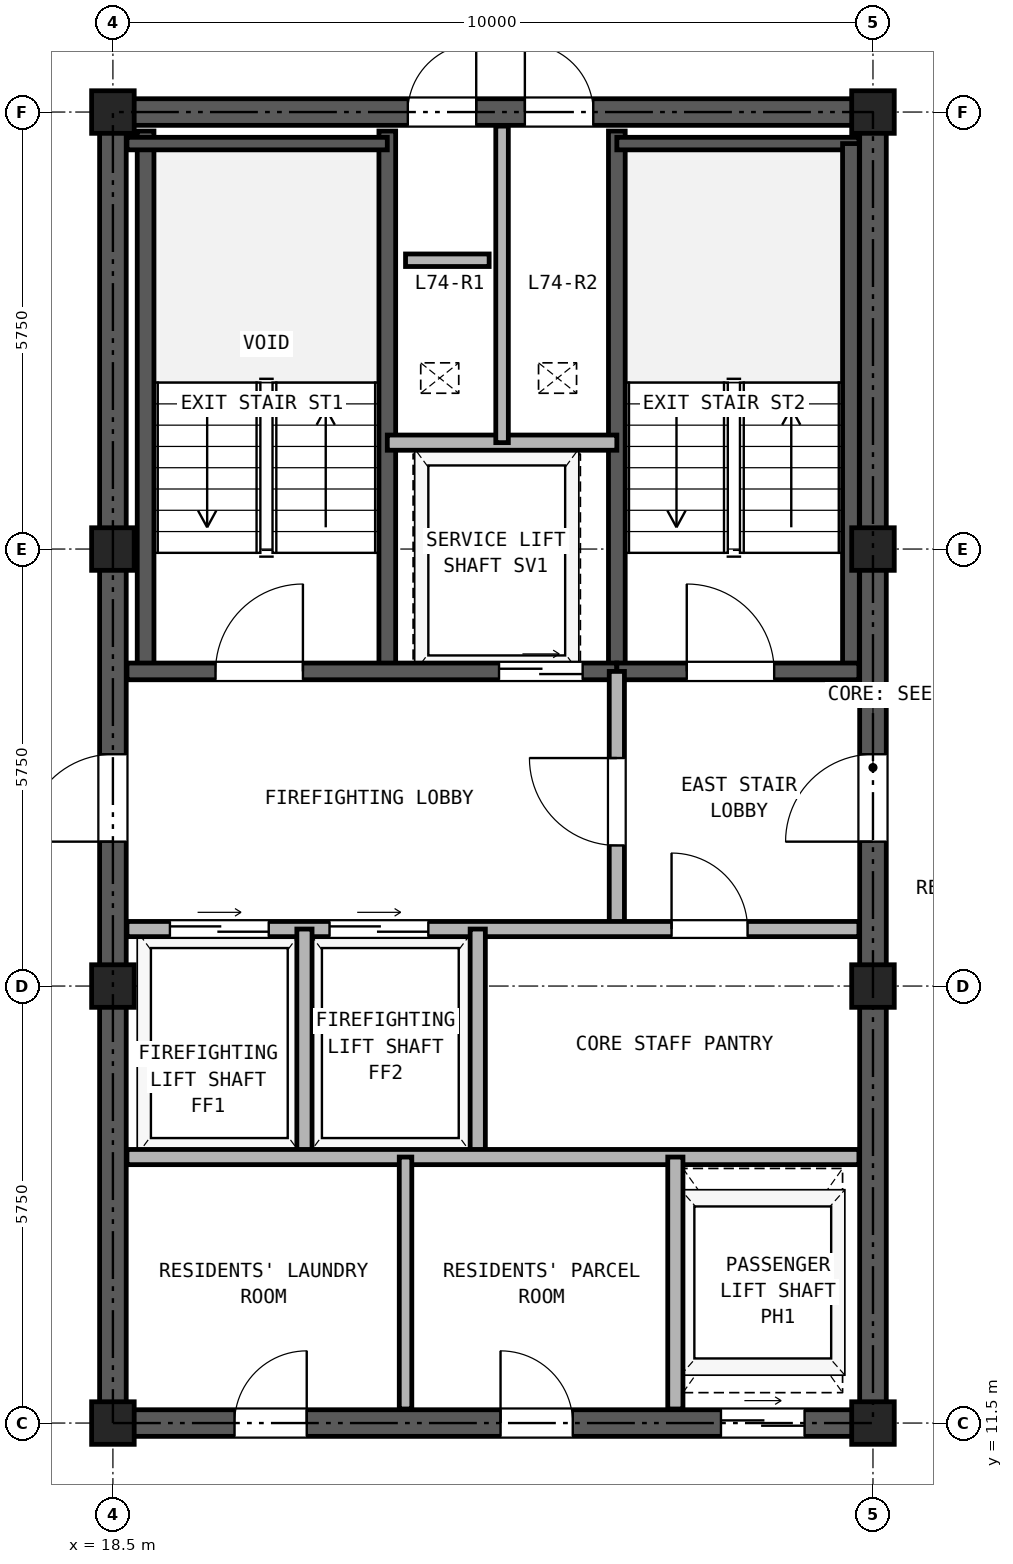
"""IFC4 building model, lengths in metres.
Left out: names, types, materials, properties, quantities, classifications, styles, units other than length and angle.
Written with IfcOpenShell. Run it as: python <this file> out.ifc"""

import sys

from ifc_helpers import new_model, si_unit, direction, frame, frame_2d, origin, origin_2d, place, context, subcontext, project, spatial, rectangle, hollow_rectangle, extrude, source, transform, mapped, element, fill, save


model = new_model("IFC4")
c1 = context("Model", 3, precision=1e-05, world=origin(), true_north=direction((0.0, 1.0)))
c2 = subcontext(c1, "Body", "Model", "MODEL_VIEW")
j1 = project(units=[si_unit("LENGTHUNIT", "METRE"), si_unit("PLANEANGLEUNIT", "RADIAN")], contexts=[c1])
p1 = place(None, origin())
s1 = spatial("IfcSite", under=j1, at=p1, CompositionType="ELEMENT")
p2 = place(p1, origin())
s2 = spatial("IfcBuilding", under=s1, at=p2, CompositionType="ELEMENT")
p3 = place(p2, frame((0.0, 0.0, 258.5)))
s3 = spatial("IfcBuildingStorey", under=s2, at=p3, CompositionType="ELEMENT", Elevation=258.5)
m1 = source(origin(), c2, "Body", "SweptSolid", [
    extrude(hollow_rectangle(XDim=0.56, YDim=0.56, WallThickness=0.03, at=origin_2d()), origin(), (0.0, 0.0, 1.0), 2.98),
])
for number, where, z_axis, x_axis in (
    (1, (18.5, 11.5, 0.0), (0.0, 0.0, 1.0), (1.0, 0.0, 0.0)),
    (2, (18.5, 17.25, 0.0), (0.0, 0.0, 1.0), (1.0, 0.0, 0.0)),
    (3, (18.5, 23.0, 0.0), (0.0, 0.0, 1.0), (1.0, 0.0, 0.0)),
    (4, (18.5, 28.75, 0.0), (0.0, 0.0, 1.0), (1.0, 0.0, 0.0)),
    (5, (28.5, 11.5, 0.0), (0.0, 0.0, 1.0), (1.0, 0.0, 0.0)),
    (6, (28.5, 17.25, 0.0), (0.0, 0.0, 1.0), (1.0, 0.0, 0.0)),
    (7, (28.5, 23.0, 0.0), (0.0, 0.0, 1.0), (1.0, 0.0, 0.0)),
    (8, (28.5, 28.75, 0.0), (0.0, 0.0, 1.0), (1.0, 0.0, 0.0)),
):
    element("IfcColumn", number, at=place(p3, frame(where, z_axis=z_axis, x_axis=x_axis)), inside=s3, PredefinedType="COLUMN", context=c2, shape_type="MappedRepresentation", body=[
        mapped(m1, transform((0.0, 0.0, 0.0), x_axis=(1.0, 0.0, 0.0), y_axis=(0.0, 1.0, 0.0), z_axis=(0.0, 0.0, 1.0), scale=1.0)),
    ])
p4 = place(p3, frame((18.325, 11.5, 0.0), z_axis=(0.0, 0.0, 1.0), x_axis=(1.0, 0.0, 0.0)))
e9 = element("IfcWall", 9, at=p4, inside=s3, PredefinedType="SHEAR", context=c2, shape_type="SweptSolid", body=[
    extrude(rectangle(XDim=10.35, YDim=0.35, at=frame_2d((5.175, 0.0))), origin(), (0.0, 0.0, 1.0), 2.98),
])
p5 = place(p4, frame((1.775, 0.0, 0.0)))
e10 = element("IfcOpeningElement", 10, at=p5, cuts=e9, PredefinedType="OPENING", context=c2, shape_type="SweptSolid", body=[
    extrude(rectangle(XDim=0.95, YDim=2.15, at=frame_2d((0.475, 1.075))), frame((0.0, 0.185, 0.0), z_axis=(0.0, -1.0, 0.0), x_axis=(1.0, 0.0, 0.0)), (0.0, 0.0, 1.0), 0.37),
])
p6 = place(p4, frame((5.275, 0.0, 0.0)))
e11 = element("IfcOpeningElement", 11, at=p6, cuts=e9, PredefinedType="OPENING", context=c2, shape_type="SweptSolid", body=[
    extrude(rectangle(XDim=0.95, YDim=2.15, at=frame_2d((0.475, 1.075))), frame((0.0, 0.185, 0.0), z_axis=(0.0, -1.0, 0.0), x_axis=(1.0, 0.0, 0.0)), (0.0, 0.0, 1.0), 0.37),
])
p7 = place(p4, frame((8.175, 0.0, 0.0)))
e12 = element("IfcOpeningElement", 12, at=p7, cuts=e9, PredefinedType="OPENING", context=c2, shape_type="SweptSolid", body=[
    extrude(rectangle(XDim=1.1, YDim=2.25, at=frame_2d((0.55, 1.125))), frame((0.0, 0.185, 0.0), z_axis=(0.0, -1.0, 0.0), x_axis=(1.0, 0.0, 0.0)), (0.0, 0.0, 1.0), 0.37),
])
p8 = place(p3, frame((18.325, 28.75, 0.0), z_axis=(0.0, 0.0, 1.0), x_axis=(1.0, 0.0, 0.0)))
e13 = element("IfcWall", 13, at=p8, inside=s3, PredefinedType="SHEAR", context=c2, shape_type="SweptSolid", body=[
    extrude(rectangle(XDim=10.35, YDim=0.35, at=frame_2d((5.175, 0.0))), origin(), (0.0, 0.0, 1.0), 2.98),
])
p9 = place(p8, frame((4.055, 0.0, 0.0)))
e14 = element("IfcOpeningElement", 14, at=p9, cuts=e13, PredefinedType="OPENING", context=c2, shape_type="SweptSolid", body=[
    extrude(rectangle(XDim=0.9, YDim=2.05, at=frame_2d((0.45, 1.025))), frame((0.0, 0.185, 0.0), z_axis=(0.0, -1.0, 0.0), x_axis=(1.0, 0.0, 0.0)), (0.0, 0.0, 1.0), 0.37),
])
p10 = place(p8, frame((5.595, 0.0, 0.0)))
e15 = element("IfcOpeningElement", 15, at=p10, cuts=e13, PredefinedType="OPENING", context=c2, shape_type="SweptSolid", body=[
    extrude(rectangle(XDim=0.9, YDim=2.05, at=frame_2d((0.45, 1.025))), frame((0.0, 0.185, 0.0), z_axis=(0.0, -1.0, 0.0), x_axis=(1.0, 0.0, 0.0)), (0.0, 0.0, 1.0), 0.37),
])
p11 = place(p3, frame((18.5, 11.675, 0.0), z_axis=(0.0, 0.0, 1.0), x_axis=(0.0, 1.0, 0.0)))
e16 = element("IfcWall", 16, at=p11, inside=s3, PredefinedType="SHEAR", context=c2, shape_type="SweptSolid", body=[
    extrude(rectangle(XDim=16.9, YDim=0.35, at=frame_2d((8.45, 0.0))), origin(), (0.0, 0.0, 1.0), 2.98),
])
p12 = place(p11, frame((7.475, 0.0, 0.0)))
e17 = element("IfcOpeningElement", 17, at=p12, cuts=e16, PredefinedType="OPENING", context=c2, shape_type="SweptSolid", body=[
    extrude(rectangle(XDim=1.15, YDim=2.2, at=frame_2d((0.575, 1.1))), frame((0.0, 0.185, 0.0), z_axis=(0.0, -1.0, 0.0), x_axis=(1.0, 0.0, 0.0)), (0.0, 0.0, 1.0), 0.37),
])
p13 = place(p3, frame((28.5, 11.675, 0.0), z_axis=(0.0, 0.0, 1.0), x_axis=(0.0, 1.0, 0.0)))
e18 = element("IfcWall", 18, at=p13, inside=s3, PredefinedType="SHEAR", context=c2, shape_type="SweptSolid", body=[
    extrude(rectangle(XDim=16.9, YDim=0.35, at=frame_2d((8.45, 0.0))), origin(), (0.0, 0.0, 1.0), 2.98),
])
p14 = place(p13, frame((7.475, 0.0, 0.0)))
e19 = element("IfcOpeningElement", 19, at=p14, cuts=e18, PredefinedType="OPENING", context=c2, shape_type="SweptSolid", body=[
    extrude(rectangle(XDim=1.15, YDim=2.2, at=frame_2d((0.575, 1.1))), frame((0.0, 0.185, 0.0), z_axis=(0.0, -1.0, 0.0), x_axis=(1.0, 0.0, 0.0)), (0.0, 0.0, 1.0), 0.37),
])
for number, where, z_axis, x_axis in (
    (20, (18.93, 21.39, 0.0), (0.0, 0.0, 1.0), (0.0, 1.0, 0.0)),
    (21, (22.11, 21.39, 0.0), (0.0, 0.0, 1.0), (0.0, 1.0, 0.0)),
    (22, (25.13, 21.39, 0.0), (0.0, 0.0, 1.0), (0.0, 1.0, 0.0)),
):
    element("IfcWall", number, at=place(p3, frame(where, z_axis=z_axis, x_axis=x_axis)), inside=s3, PredefinedType="SOLIDWALL", context=c2, shape_type="SweptSolid", body=[
        extrude(rectangle(XDim=7.11, YDim=0.22, at=frame_2d((3.555, 0.0))), origin(), (0.0, 0.0, 1.0), 2.98),
    ])
p15 = place(p3, frame((18.685, 28.335, 0.0), z_axis=(0.0, 0.0, 1.0), x_axis=(1.0, 0.0, 0.0)))
e23 = element("IfcWall", 23, at=p15, inside=s3, PredefinedType="PARTITIONING", context=c2, shape_type="SweptSolid", body=[
    extrude(rectangle(XDim=3.425, YDim=0.165, at=frame_2d((1.712, 0.0))), origin(), (0.0, 0.0, 1.0), 2.98),
])
p16 = place(p3, frame((25.13, 28.335, 0.0), z_axis=(0.0, 0.0, 1.0), x_axis=(1.0, 0.0, 0.0)))
e24 = element("IfcWall", 24, at=p16, inside=s3, PredefinedType="PARTITIONING", context=c2, shape_type="SweptSolid", body=[
    extrude(rectangle(XDim=3.185, YDim=0.165, at=frame_2d((1.593, 0.0))), origin(), (0.0, 0.0, 1.0), 2.98),
])
p17 = place(p3, frame((28.21, 21.39, 0.0), z_axis=(0.0, 0.0, 1.0), x_axis=(0.0, 1.0, 0.0)))
e25 = element("IfcWall", 25, at=p17, inside=s3, PredefinedType="SOLIDWALL", context=c2, shape_type="SweptSolid", body=[
    extrude(rectangle(XDim=6.945, YDim=0.22, at=frame_2d((3.473, 0.0))), origin(), (0.0, 0.0, 1.0), 2.98),
])
p18 = place(p3, frame((18.685, 21.39, 0.0), z_axis=(0.0, 0.0, 1.0), x_axis=(1.0, 0.0, 0.0)))
e26 = element("IfcWall", 26, at=p18, inside=s3, PredefinedType="SOLIDWALL", context=c2, shape_type="SweptSolid", body=[
    extrude(rectangle(XDim=6.445, YDim=0.22, at=frame_2d((3.222, 0.0))), origin(), (0.0, 0.0, 1.0), 2.98),
])
p19 = place(p18, frame((1.165, 0.0, 0.0)))
e27 = element("IfcOpeningElement", 27, at=p19, cuts=e26, PredefinedType="OPENING", context=c2, shape_type="SweptSolid", body=[
    extrude(rectangle(XDim=1.15, YDim=2.2, at=frame_2d((0.575, 1.1))), frame((0.0, 0.12, 0.0), z_axis=(0.0, -1.0, 0.0), x_axis=(1.0, 0.0, 0.0)), (0.0, 0.0, 1.0), 0.24),
])
p20 = place(p18, frame((4.895, 0.0, 0.0)))
e28 = element("IfcOpeningElement", 28, at=p20, cuts=e26, PredefinedType="OPENING", context=c2, shape_type="SweptSolid", body=[
    extrude(rectangle(XDim=1.1, YDim=2.25, at=frame_2d((0.55, 1.125))), frame((0.0, 0.12, 0.0), z_axis=(0.0, -1.0, 0.0), x_axis=(1.0, 0.0, 0.0)), (0.0, 0.0, 1.0), 0.24),
])
p21 = place(p3, frame((25.13, 21.39, 0.0), z_axis=(0.0, 0.0, 1.0), x_axis=(1.0, 0.0, 0.0)))
e29 = element("IfcWall", 29, at=p21, inside=s3, PredefinedType="SOLIDWALL", context=c2, shape_type="SweptSolid", body=[
    extrude(rectangle(XDim=3.185, YDim=0.22, at=frame_2d((1.593, 0.0))), origin(), (0.0, 0.0, 1.0), 2.98),
])
p22 = place(p21, frame((0.92, 0.0, 0.0)))
e30 = element("IfcOpeningElement", 30, at=p22, cuts=e29, PredefinedType="OPENING", context=c2, shape_type="SweptSolid", body=[
    extrude(rectangle(XDim=1.15, YDim=2.2, at=frame_2d((0.575, 1.1))), frame((0.0, 0.12, 0.0), z_axis=(0.0, -1.0, 0.0), x_axis=(1.0, 0.0, 0.0)), (0.0, 0.0, 1.0), 0.24),
])
p23 = place(p3, frame((22.11, 24.4, 0.0), z_axis=(0.0, 0.0, 1.0), x_axis=(1.0, 0.0, 0.0)))
e31 = element("IfcWall", 31, at=p23, inside=s3, PredefinedType="PARTITIONING", context=c2, shape_type="SweptSolid", body=[
    extrude(rectangle(XDim=3.02, YDim=0.2, at=frame_2d((1.51, 0.0))), origin(), (0.0, 0.0, 1.0), 2.98),
])
p24 = place(p3, frame((23.62, 24.4, 0.0), z_axis=(0.0, 0.0, 1.0), x_axis=(0.0, 1.0, 0.0)))
e32 = element("IfcWall", 32, at=p24, inside=s3, PredefinedType="PARTITIONING", context=c2, shape_type="SweptSolid", body=[
    extrude(rectangle(XDim=4.165, YDim=0.165, at=frame_2d((2.083, 0.0))), origin(), (0.0, 0.0, 1.0), 2.98),
])
p25 = place(p3, frame((25.13, 18.0, 0.0), z_axis=(0.0, 0.0, 1.0), x_axis=(0.0, 1.0, 0.0)))
e33 = element("IfcWall", 33, at=p25, inside=s3, PredefinedType="PARTITIONING", context=c2, shape_type="SweptSolid", body=[
    extrude(rectangle(XDim=3.39, YDim=0.2, at=frame_2d((1.695, 0.0))), origin(), (0.0, 0.0, 1.0), 2.98),
])
p26 = place(p25, frame((1.1, 0.0, 0.0)))
e34 = element("IfcOpeningElement", 34, at=p26, cuts=e33, PredefinedType="OPENING", context=c2, shape_type="SweptSolid", body=[
    extrude(rectangle(XDim=1.15, YDim=2.2, at=frame_2d((0.575, 1.1))), frame((0.0, 0.11, 0.0), z_axis=(0.0, -1.0, 0.0), x_axis=(1.0, 0.0, 0.0)), (0.0, 0.0, 1.0), 0.22),
])
p27 = place(p3, frame((18.685, 18.0, 0.0), z_axis=(0.0, 0.0, 1.0), x_axis=(1.0, 0.0, 0.0)))
e35 = element("IfcWall", 35, at=p27, inside=s3, PredefinedType="PARTITIONING", context=c2, shape_type="SweptSolid", body=[
    extrude(rectangle(XDim=9.63, YDim=0.2, at=frame_2d((4.815, 0.0))), origin(), (0.0, 0.0, 1.0), 2.98),
])
p28 = place(p27, frame((0.565, 0.0, 0.0)))
e36 = element("IfcOpeningElement", 36, at=p28, cuts=e35, PredefinedType="OPENING", context=c2, shape_type="SweptSolid", body=[
    extrude(rectangle(XDim=1.3, YDim=2.3, at=frame_2d((0.65, 1.15))), frame((0.0, 0.11, 0.0), z_axis=(0.0, -1.0, 0.0), x_axis=(1.0, 0.0, 0.0)), (0.0, 0.0, 1.0), 0.22),
])
p29 = place(p27, frame((2.665, 0.0, 0.0)))
e37 = element("IfcOpeningElement", 37, at=p29, cuts=e35, PredefinedType="OPENING", context=c2, shape_type="SweptSolid", body=[
    extrude(rectangle(XDim=1.3, YDim=2.3, at=frame_2d((0.65, 1.15))), frame((0.0, 0.11, 0.0), z_axis=(0.0, -1.0, 0.0), x_axis=(1.0, 0.0, 0.0)), (0.0, 0.0, 1.0), 0.22),
])
p30 = place(p27, frame((7.165, 0.0, 0.0)))
e38 = element("IfcOpeningElement", 38, at=p30, cuts=e35, PredefinedType="OPENING", context=c2, shape_type="SweptSolid", body=[
    extrude(rectangle(XDim=1.0, YDim=2.15, at=frame_2d((0.5, 1.075))), frame((0.0, 0.11, 0.0), z_axis=(0.0, -1.0, 0.0), x_axis=(1.0, 0.0, 0.0)), (0.0, 0.0, 1.0), 0.22),
])
for number, where, z_axis, x_axis in (
    (39, (21.02, 15.0, 0.0), (0.0, 0.0, 1.0), (0.0, 1.0, 0.0)),
    (40, (23.3, 15.0, 0.0), (0.0, 0.0, 1.0), (0.0, 1.0, 0.0)),
):
    element("IfcWall", number, at=place(p3, frame(where, z_axis=z_axis, x_axis=x_axis)), inside=s3, PredefinedType="PARTITIONING", context=c2, shape_type="SweptSolid", body=[
        extrude(rectangle(XDim=3.0, YDim=0.2, at=frame_2d((1.5, 0.0))), origin(), (0.0, 0.0, 1.0), 2.98),
    ])
p31 = place(p3, frame((18.685, 15.0, 0.0), z_axis=(0.0, 0.0, 1.0), x_axis=(1.0, 0.0, 0.0)))
e41 = element("IfcWall", 41, at=p31, inside=s3, PredefinedType="PARTITIONING", context=c2, shape_type="SweptSolid", body=[
    extrude(rectangle(XDim=9.63, YDim=0.2, at=frame_2d((4.815, 0.0))), origin(), (0.0, 0.0, 1.0), 2.98),
])
p32 = place(p3, frame((22.35, 11.685, 0.0), z_axis=(0.0, 0.0, 1.0), x_axis=(0.0, 1.0, 0.0)))
e42 = element("IfcWall", 42, at=p32, inside=s3, PredefinedType="PARTITIONING", context=c2, shape_type="SweptSolid", body=[
    extrude(rectangle(XDim=3.315, YDim=0.165, at=frame_2d((1.657, 0.0))), origin(), (0.0, 0.0, 1.0), 2.98),
])
p33 = place(p3, frame((25.9, 11.685, 0.0), z_axis=(0.0, 0.0, 1.0), x_axis=(0.0, 1.0, 0.0)))
e43 = element("IfcWall", 43, at=p33, inside=s3, PredefinedType="PARTITIONING", context=c2, shape_type="SweptSolid", body=[
    extrude(rectangle(XDim=3.315, YDim=0.2, at=frame_2d((1.657, 0.0))), origin(), (0.0, 0.0, 1.0), 2.98),
])
p34 = place(p3, frame((22.35, 26.8, 0.0), z_axis=(0.0, 0.0, 1.0), x_axis=(1.0, 0.0, 0.0)))
e44 = element("IfcWall", 44, at=p34, inside=s3, PredefinedType="PARTITIONING", context=c2, shape_type="SweptSolid", body=[
    extrude(rectangle(XDim=1.1, YDim=0.165, at=frame_2d((0.55, 0.0))), origin(), (0.0, 0.0, 1.0), 2.98),
])
p35 = place(p19, frame((1.15, 0.0, 0.0), z_axis=(0.0, 0.0, 1.0), x_axis=(-1.0, 0.0, 0.0)))
e45 = element("IfcDoor", 45, at=p35, inside=s3, OperationType="SINGLE_SWING_RIGHT", PredefinedType="DOOR", context=c2, shape_type="SweptSolid", body=[
    extrude(rectangle(XDim=1.15, YDim=2.2, at=frame_2d((0.575, 1.1))), frame((0.0, 0.025, 0.0), z_axis=(0.0, -1.0, 0.0), x_axis=(1.0, 0.0, 0.0)), (0.0, 0.0, 1.0), 0.05),
])
fill(e27, e45)
p36 = place(p22, frame((1.15, 0.0, 0.0), z_axis=(0.0, 0.0, 1.0), x_axis=(-1.0, 0.0, 0.0)))
e46 = element("IfcDoor", 46, at=p36, inside=s3, OperationType="SINGLE_SWING_LEFT", PredefinedType="DOOR", context=c2, shape_type="SweptSolid", body=[
    extrude(rectangle(XDim=1.15, YDim=2.2, at=frame_2d((0.575, 1.1))), frame((0.0, 0.025, 0.0), z_axis=(0.0, -1.0, 0.0), x_axis=(1.0, 0.0, 0.0)), (0.0, 0.0, 1.0), 0.05),
])
fill(e30, e46)
p37 = place(p20, frame((1.1, 0.0, 0.0), z_axis=(0.0, 0.0, 1.0), x_axis=(-1.0, 0.0, 0.0)))
e47 = element("IfcDoor", 47, at=p37, inside=s3, OperationType="DOUBLE_DOOR_SLIDING", PredefinedType="DOOR", context=c2, shape_type="SweptSolid", body=[
    extrude(rectangle(XDim=1.1, YDim=2.25, at=frame_2d((0.55, 1.125))), frame((0.0, 0.025, 0.0), z_axis=(0.0, -1.0, 0.0), x_axis=(1.0, 0.0, 0.0)), (0.0, 0.0, 1.0), 0.05),
])
fill(e28, e47)
p38 = place(p26, origin())
e48 = element("IfcDoor", 48, at=p38, inside=s3, OperationType="SINGLE_SWING_RIGHT", PredefinedType="DOOR", context=c2, shape_type="SweptSolid", body=[
    extrude(rectangle(XDim=1.15, YDim=2.2, at=frame_2d((0.575, 1.1))), frame((0.0, 0.025, 0.0), z_axis=(0.0, -1.0, 0.0), x_axis=(1.0, 0.0, 0.0)), (0.0, 0.0, 1.0), 0.05),
])
fill(e34, e48)
p39 = place(p28, origin())
e49 = element("IfcDoor", 49, at=p39, inside=s3, OperationType="DOUBLE_DOOR_SLIDING", PredefinedType="DOOR", context=c2, shape_type="SweptSolid", body=[
    extrude(rectangle(XDim=1.3, YDim=2.3, at=frame_2d((0.65, 1.15))), frame((0.0, 0.025, 0.0), z_axis=(0.0, -1.0, 0.0), x_axis=(1.0, 0.0, 0.0)), (0.0, 0.0, 1.0), 0.05),
])
fill(e36, e49)
p40 = place(p29, origin())
e50 = element("IfcDoor", 50, at=p40, inside=s3, OperationType="DOUBLE_DOOR_SLIDING", PredefinedType="DOOR", context=c2, shape_type="SweptSolid", body=[
    extrude(rectangle(XDim=1.3, YDim=2.3, at=frame_2d((0.65, 1.15))), frame((0.0, 0.025, 0.0), z_axis=(0.0, -1.0, 0.0), x_axis=(1.0, 0.0, 0.0)), (0.0, 0.0, 1.0), 0.05),
])
fill(e37, e50)
p41 = place(p30, frame((1.0, 0.0, 0.0), z_axis=(0.0, 0.0, 1.0), x_axis=(-1.0, 0.0, 0.0)))
e51 = element("IfcDoor", 51, at=p41, inside=s3, OperationType="SINGLE_SWING_LEFT", PredefinedType="DOOR", context=c2, shape_type="SweptSolid", body=[
    extrude(rectangle(XDim=1.0, YDim=2.15, at=frame_2d((0.5, 1.075))), frame((0.0, 0.025, 0.0), z_axis=(0.0, -1.0, 0.0), x_axis=(1.0, 0.0, 0.0)), (0.0, 0.0, 1.0), 0.05),
])
fill(e38, e51)
p42 = place(p12, frame((1.15, 0.0, 0.0), z_axis=(0.0, 0.0, 1.0), x_axis=(-1.0, 0.0, 0.0)))
e52 = element("IfcDoor", 52, at=p42, inside=s3, OperationType="SINGLE_SWING_LEFT", PredefinedType="DOOR", context=c2, shape_type="SweptSolid", body=[
    extrude(rectangle(XDim=1.15, YDim=2.2, at=frame_2d((0.575, 1.1))), frame((0.0, 0.025, 0.0), z_axis=(0.0, -1.0, 0.0), x_axis=(1.0, 0.0, 0.0)), (0.0, 0.0, 1.0), 0.05),
])
fill(e17, e52)
p43 = place(p14, origin())
e53 = element("IfcDoor", 53, at=p43, inside=s3, OperationType="SINGLE_SWING_LEFT", PredefinedType="DOOR", context=c2, shape_type="SweptSolid", body=[
    extrude(rectangle(XDim=1.15, YDim=2.2, at=frame_2d((0.575, 1.1))), frame((0.0, 0.025, 0.0), z_axis=(0.0, -1.0, 0.0), x_axis=(1.0, 0.0, 0.0)), (0.0, 0.0, 1.0), 0.05),
])
fill(e19, e53)
p44 = place(p9, origin())
e54 = element("IfcDoor", 54, at=p44, inside=s3, OperationType="SINGLE_SWING_RIGHT", PredefinedType="DOOR", context=c2, shape_type="SweptSolid", body=[
    extrude(rectangle(XDim=0.9, YDim=2.05, at=frame_2d((0.45, 1.025))), frame((0.0, 0.025, 0.0), z_axis=(0.0, -1.0, 0.0), x_axis=(1.0, 0.0, 0.0)), (0.0, 0.0, 1.0), 0.05),
])
fill(e14, e54)
p45 = place(p10, origin())
e55 = element("IfcDoor", 55, at=p45, inside=s3, OperationType="SINGLE_SWING_LEFT", PredefinedType="DOOR", context=c2, shape_type="SweptSolid", body=[
    extrude(rectangle(XDim=0.9, YDim=2.05, at=frame_2d((0.45, 1.025))), frame((0.0, 0.025, 0.0), z_axis=(0.0, -1.0, 0.0), x_axis=(1.0, 0.0, 0.0)), (0.0, 0.0, 1.0), 0.05),
])
fill(e15, e55)
p46 = place(p5, frame((0.95, 0.0, 0.0), z_axis=(0.0, 0.0, 1.0), x_axis=(-1.0, 0.0, 0.0)))
e56 = element("IfcDoor", 56, at=p46, inside=s3, OperationType="SINGLE_SWING_RIGHT", PredefinedType="DOOR", context=c2, shape_type="SweptSolid", body=[
    extrude(rectangle(XDim=0.95, YDim=2.15, at=frame_2d((0.475, 1.075))), frame((0.0, 0.025, 0.0), z_axis=(0.0, -1.0, 0.0), x_axis=(1.0, 0.0, 0.0)), (0.0, 0.0, 1.0), 0.05),
])
fill(e10, e56)
p47 = place(p6, frame((0.95, 0.0, 0.0), z_axis=(0.0, 0.0, 1.0), x_axis=(-1.0, 0.0, 0.0)))
e57 = element("IfcDoor", 57, at=p47, inside=s3, OperationType="SINGLE_SWING_LEFT", PredefinedType="DOOR", context=c2, shape_type="SweptSolid", body=[
    extrude(rectangle(XDim=0.95, YDim=2.15, at=frame_2d((0.475, 1.075))), frame((0.0, 0.025, 0.0), z_axis=(0.0, -1.0, 0.0), x_axis=(1.0, 0.0, 0.0)), (0.0, 0.0, 1.0), 0.05),
])
fill(e11, e57)
p48 = place(p7, frame((1.1, 0.0, 0.0), z_axis=(0.0, 0.0, 1.0), x_axis=(-1.0, 0.0, 0.0)))
e58 = element("IfcDoor", 58, at=p48, inside=s3, OperationType="DOUBLE_DOOR_SLIDING", PredefinedType="DOOR", context=c2, shape_type="SweptSolid", body=[
    extrude(rectangle(XDim=1.1, YDim=2.25, at=frame_2d((0.55, 1.125))), frame((0.0, 0.025, 0.0), z_axis=(0.0, -1.0, 0.0), x_axis=(1.0, 0.0, 0.0)), (0.0, 0.0, 1.0), 0.05),
])
fill(e12, e58)
save(model, sys.argv[1])
